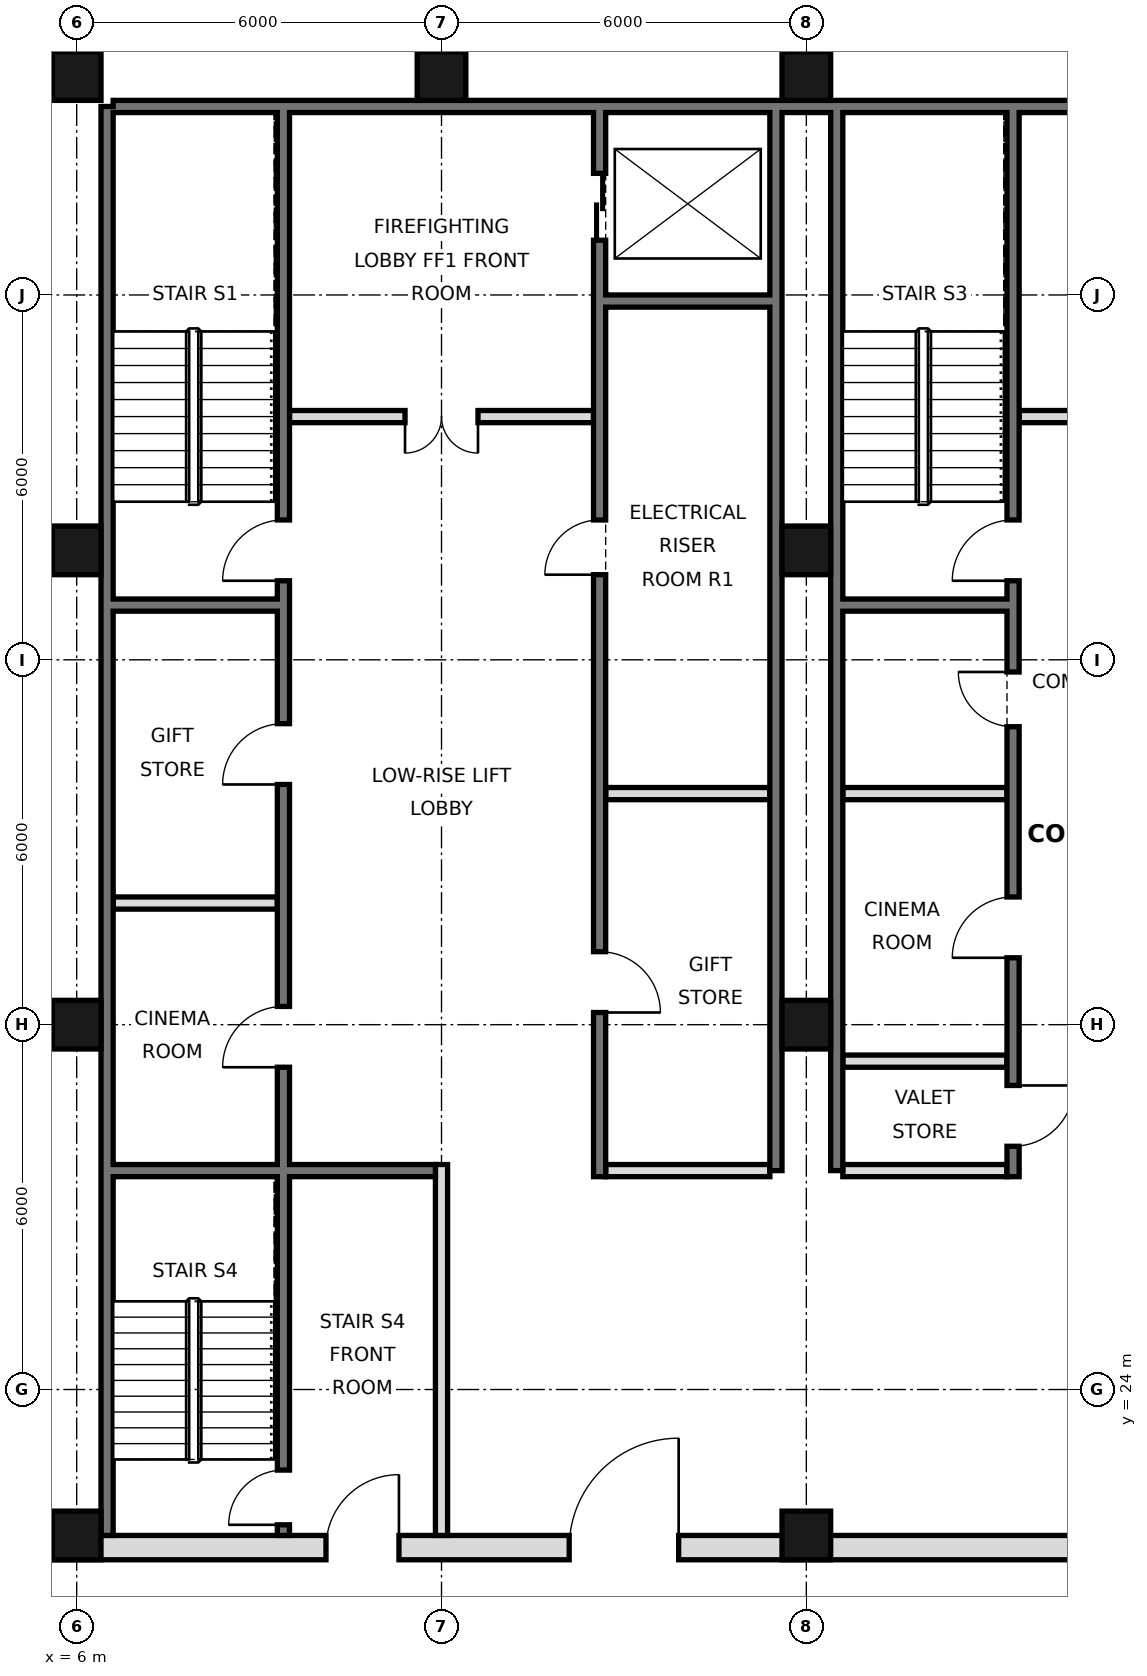
"""IFC4 building model, lengths in metres.
Left out: names, types, materials, properties, quantities, classifications, styles, units other than length and angle.
Written with IfcOpenShell. Run it as: python <this file> out.ifc"""

import sys

from ifc_helpers import new_model, si_unit, direction, frame, frame_2d, origin, origin_2d, place, context, subcontext, project, spatial, rectangle, hollow_rectangle, extrude, element, fill, save


model = new_model("IFC4")
c1 = context("Model", 3, precision=1e-05, world=origin(), true_north=direction((0.0, 1.0)))
c2 = subcontext(c1, "Body", "Model", "MODEL_VIEW")
j1 = project(units=[si_unit("LENGTHUNIT", "METRE"), si_unit("PLANEANGLEUNIT", "RADIAN")], contexts=[c1])
p1 = place(None, origin())
s1 = spatial("IfcSite", under=j1, at=p1, CompositionType="ELEMENT")
p2 = place(p1, origin())
s2 = spatial("IfcBuilding", under=s1, at=p2, CompositionType="ELEMENT")
p3 = place(p2, frame((0.0, 0.0, 254.0)))
s3 = spatial("IfcBuildingStorey", under=s2, at=p3, CompositionType="ELEMENT", Elevation=254.0)
for number, where, z_axis, x_axis in (
    (1, (6.0, 21.6, 0.0), (0.0, 0.0, 1.0), (1.0, 0.0, 0.0)),
    (2, (6.0, 30.0, 0.0), (0.0, 0.0, 1.0), (1.0, 0.0, 0.0)),
    (3, (6.0, 37.8, 0.0), (0.0, 0.0, 1.0), (1.0, 0.0, 0.0)),
    (4, (6.0, 45.6, 0.0), (0.0, 0.0, 1.0), (1.0, 0.0, 0.0)),
    (5, (12.0, 45.6, 0.0), (0.0, 0.0, 1.0), (1.0, 0.0, 0.0)),
    (6, (18.0, 21.6, 0.0), (0.0, 0.0, 1.0), (1.0, 0.0, 0.0)),
    (7, (18.0, 30.0, 0.0), (0.0, 0.0, 1.0), (1.0, 0.0, 0.0)),
    (8, (18.0, 37.8, 0.0), (0.0, 0.0, 1.0), (1.0, 0.0, 0.0)),
    (9, (18.0, 45.6, 0.0), (0.0, 0.0, 1.0), (1.0, 0.0, 0.0)),
):
    element("IfcColumn", number, at=place(p3, frame(where, z_axis=z_axis, x_axis=x_axis)), inside=s3, PredefinedType="COLUMN", context=c2, shape_type="SweptSolid", body=[
        extrude(hollow_rectangle(XDim=0.8, YDim=0.8, WallThickness=0.032, at=origin_2d()), origin(), (0.0, 0.0, 1.0), 3.6),
    ])
p4 = place(p3, frame((6.5, 21.6, 0.0), z_axis=(0.0, 0.0, 1.0), x_axis=(0.0, 1.0, 0.0)))
e10 = element("IfcWall", 10, at=p4, inside=s3, PredefinedType="SOLIDWALL", context=c2, shape_type="SweptSolid", body=[
    extrude(rectangle(XDim=23.5, YDim=0.2, at=frame_2d((11.75, 0.0))), origin(), (0.0, 0.0, 1.0), 3.38),
])
p5 = place(p3, frame((6.6, 45.1, 0.0), z_axis=(0.0, 0.0, 1.0), x_axis=(1.0, 0.0, 0.0)))
e11 = element("IfcWall", 11, at=p5, inside=s3, PredefinedType="SOLIDWALL", context=c2, shape_type="SweptSolid", body=[
    extrude(rectangle(XDim=34.8, YDim=0.2, at=frame_2d((17.4, 0.0))), origin(), (0.0, 0.0, 1.0), 3.38),
])
for number, where, z_axis, x_axis in (
    (12, (17.5, 27.6, 0.0), (0.0, 0.0, 1.0), (0.0, 1.0, 0.0)),
    (13, (18.5, 27.6, 0.0), (0.0, 0.0, 1.0), (0.0, 1.0, 0.0)),
):
    element("IfcWall", number, at=place(p3, frame(where, z_axis=z_axis, x_axis=x_axis)), inside=s3, PredefinedType="SOLIDWALL", context=c2, shape_type="SweptSolid", body=[
        extrude(rectangle(XDim=17.5, YDim=0.2, at=frame_2d((8.75, 0.0))), origin(), (0.0, 0.0, 1.0), 3.38),
    ])
p6 = place(p3, frame((5.6, 21.4, 0.0), z_axis=(0.0, 0.0, 1.0), x_axis=(1.0, 0.0, 0.0)))
e14 = element("IfcWall", 14, at=p6, inside=s3, PredefinedType="SOLIDWALL", context=c2, shape_type="SweptSolid", body=[
    extrude(rectangle(XDim=36.8, YDim=0.4, at=frame_2d((18.4, 0.0))), origin(), (0.0, 0.0, 1.0), 3.38),
])
p7 = place(p6, frame((8.5, 0.0, 0.0)))
e15 = element("IfcOpeningElement", 15, at=p7, cuts=e14, PredefinedType="OPENING", context=c2, shape_type="SweptSolid", body=[
    extrude(rectangle(XDim=1.8, YDim=2.1, at=frame_2d((0.9, 1.05))), frame((0.0, 0.21, 0.0), z_axis=(0.0, -1.0, 0.0), x_axis=(1.0, 0.0, 0.0)), (0.0, 0.0, 1.0), 0.42),
])
p8 = place(p6, frame((17.5, 0.0, 0.0)))
e16 = element("IfcOpeningElement", 16, at=p8, cuts=e14, PredefinedType="OPENING", context=c2, shape_type="SweptSolid", body=[
    extrude(rectangle(XDim=1.8, YDim=2.1, at=frame_2d((0.9, 1.05))), frame((0.0, 0.21, 0.0), z_axis=(0.0, -1.0, 0.0), x_axis=(1.0, 0.0, 0.0)), (0.0, 0.0, 1.0), 0.42),
])
p9 = place(p6, frame((26.5, 0.0, 0.0)))
e17 = element("IfcOpeningElement", 17, at=p9, cuts=e14, PredefinedType="OPENING", context=c2, shape_type="SweptSolid", body=[
    extrude(rectangle(XDim=1.8, YDim=2.1, at=frame_2d((0.9, 1.05))), frame((0.0, 0.21, 0.0), z_axis=(0.0, -1.0, 0.0), x_axis=(1.0, 0.0, 0.0)), (0.0, 0.0, 1.0), 0.42),
])
p10 = place(p6, frame((4.5, 0.0, 0.0)))
e18 = element("IfcOpeningElement", 18, at=p10, cuts=e14, PredefinedType="OPENING", context=c2, shape_type="SweptSolid", body=[
    extrude(rectangle(XDim=1.2, YDim=2.1, at=frame_2d((0.6, 1.05))), frame((0.0, 0.21, 0.0), z_axis=(0.0, -1.0, 0.0), x_axis=(1.0, 0.0, 0.0)), (0.0, 0.0, 1.0), 0.42),
])
p11 = place(p6, frame((31.1, 0.0, 0.0)))
e19 = element("IfcOpeningElement", 19, at=p11, cuts=e14, PredefinedType="OPENING", context=c2, shape_type="SweptSolid", body=[
    extrude(rectangle(XDim=1.2, YDim=2.1, at=frame_2d((0.6, 1.05))), frame((0.0, 0.21, 0.0), z_axis=(0.0, -1.0, 0.0), x_axis=(1.0, 0.0, 0.0)), (0.0, 0.0, 1.0), 0.42),
])
p12 = place(p3, frame((12.0, 21.6, 0.0), z_axis=(0.0, 0.0, 1.0), x_axis=(0.0, 1.0, 0.0)))
e20 = element("IfcWall", 20, at=p12, inside=s3, PredefinedType="PARTITIONING", context=c2, shape_type="SweptSolid", body=[
    extrude(rectangle(XDim=6.1, YDim=0.2, at=frame_2d((3.05, 0.0))), origin(), (0.0, 0.0, 1.0), 3.38),
])
p13 = place(p3, frame((14.6, 27.5, 0.0), z_axis=(0.0, 0.0, 1.0), x_axis=(0.0, 1.0, 0.0)))
e21 = element("IfcWall", 21, at=p13, inside=s3, PredefinedType="SOLIDWALL", context=c2, shape_type="SweptSolid", body=[
    extrude(rectangle(XDim=17.5, YDim=0.2, at=frame_2d((8.75, 0.0))), origin(), (0.0, 0.0, 1.0), 3.38),
])
p14 = place(p13, frame((15.4, 0.0, 0.0)))
e22 = element("IfcOpeningElement", 22, at=p14, cuts=e21, PredefinedType="OPENING", context=c2, shape_type="SweptSolid", body=[
    extrude(rectangle(XDim=1.1, YDim=2.1, at=frame_2d((0.55, 1.05))), frame((0.0, 0.11, 0.0), z_axis=(0.0, -1.0, 0.0), x_axis=(1.0, 0.0, 0.0)), (0.0, 0.0, 1.0), 0.22),
])
p15 = place(p13, frame((2.7, 0.0, 0.0)))
e23 = element("IfcOpeningElement", 23, at=p15, cuts=e21, PredefinedType="OPENING", context=c2, shape_type="SweptSolid", body=[
    extrude(rectangle(XDim=1.0, YDim=2.1, at=frame_2d((0.5, 1.05))), frame((0.0, 0.11, 0.0), z_axis=(0.0, -1.0, 0.0), x_axis=(1.0, 0.0, 0.0)), (0.0, 0.0, 1.0), 0.22),
])
p16 = place(p13, frame((9.9, 0.0, 0.0)))
e24 = element("IfcOpeningElement", 24, at=p16, cuts=e21, PredefinedType="OPENING", context=c2, shape_type="SweptSolid", body=[
    extrude(rectangle(XDim=0.9, YDim=2.1, at=frame_2d((0.45, 1.05))), frame((0.0, 0.11, 0.0), z_axis=(0.0, -1.0, 0.0), x_axis=(1.0, 0.0, 0.0)), (0.0, 0.0, 1.0), 0.22),
])
p17 = place(p3, frame((21.4, 27.5, 0.0), z_axis=(0.0, 0.0, 1.0), x_axis=(0.0, 1.0, 0.0)))
e25 = element("IfcWall", 25, at=p17, inside=s3, PredefinedType="SOLIDWALL", context=c2, shape_type="SweptSolid", body=[
    extrude(rectangle(XDim=17.5, YDim=0.2, at=frame_2d((8.75, 0.0))), origin(), (0.0, 0.0, 1.0), 3.38),
])
p18 = place(p17, frame((0.5, 0.0, 0.0)))
e26 = element("IfcOpeningElement", 26, at=p18, cuts=e25, PredefinedType="OPENING", context=c2, shape_type="SweptSolid", body=[
    extrude(rectangle(XDim=1.0, YDim=2.1, at=frame_2d((0.5, 1.05))), frame((0.0, 0.11, 0.0), z_axis=(0.0, -1.0, 0.0), x_axis=(1.0, 0.0, 0.0)), (0.0, 0.0, 1.0), 0.22),
])
p19 = place(p17, frame((3.6, 0.0, 0.0)))
e27 = element("IfcOpeningElement", 27, at=p19, cuts=e25, PredefinedType="OPENING", context=c2, shape_type="SweptSolid", body=[
    extrude(rectangle(XDim=1.0, YDim=2.1, at=frame_2d((0.5, 1.05))), frame((0.0, 0.11, 0.0), z_axis=(0.0, -1.0, 0.0), x_axis=(1.0, 0.0, 0.0)), (0.0, 0.0, 1.0), 0.22),
])
p20 = place(p17, frame((9.8, 0.0, 0.0)))
e28 = element("IfcOpeningElement", 28, at=p20, cuts=e25, PredefinedType="OPENING", context=c2, shape_type="SweptSolid", body=[
    extrude(rectangle(XDim=1.0, YDim=2.1, at=frame_2d((0.5, 1.05))), frame((0.0, 0.11, 0.0), z_axis=(0.0, -1.0, 0.0), x_axis=(1.0, 0.0, 0.0)), (0.0, 0.0, 1.0), 0.22),
])
p21 = place(p17, frame((7.4, 0.0, 0.0)))
e29 = element("IfcOpeningElement", 29, at=p21, cuts=e25, PredefinedType="OPENING", context=c2, shape_type="SweptSolid", body=[
    extrude(rectangle(XDim=0.9, YDim=2.1, at=frame_2d((0.45, 1.05))), frame((0.0, 0.11, 0.0), z_axis=(0.0, -1.0, 0.0), x_axis=(1.0, 0.0, 0.0)), (0.0, 0.0, 1.0), 0.22),
])
p22 = place(p3, frame((9.4, 21.6, 0.0), z_axis=(0.0, 0.0, 1.0), x_axis=(0.0, 1.0, 0.0)))
e30 = element("IfcWall", 30, at=p22, inside=s3, PredefinedType="SOLIDWALL", context=c2, shape_type="SweptSolid", body=[
    extrude(rectangle(XDim=23.4, YDim=0.2, at=frame_2d((11.7, 0.0))), origin(), (0.0, 0.0, 1.0), 3.38),
])
p23 = place(p22, frame((7.7, 0.0, 0.0)))
e31 = element("IfcOpeningElement", 31, at=p23, cuts=e30, PredefinedType="OPENING", context=c2, shape_type="SweptSolid", body=[
    extrude(rectangle(XDim=1.0, YDim=2.1, at=frame_2d((0.5, 1.05))), frame((0.0, 0.11, 0.0), z_axis=(0.0, -1.0, 0.0), x_axis=(1.0, 0.0, 0.0)), (0.0, 0.0, 1.0), 0.22),
])
p24 = place(p22, frame((12.35, 0.0, 0.0)))
e32 = element("IfcOpeningElement", 32, at=p24, cuts=e30, PredefinedType="OPENING", context=c2, shape_type="SweptSolid", body=[
    extrude(rectangle(XDim=1.0, YDim=2.1, at=frame_2d((0.5, 1.05))), frame((0.0, 0.11, 0.0), z_axis=(0.0, -1.0, 0.0), x_axis=(1.0, 0.0, 0.0)), (0.0, 0.0, 1.0), 0.22),
])
p25 = place(p22, frame((15.7, 0.0, 0.0)))
e33 = element("IfcOpeningElement", 33, at=p25, cuts=e30, PredefinedType="OPENING", context=c2, shape_type="SweptSolid", body=[
    extrude(rectangle(XDim=1.0, YDim=2.1, at=frame_2d((0.5, 1.05))), frame((0.0, 0.11, 0.0), z_axis=(0.0, -1.0, 0.0), x_axis=(1.0, 0.0, 0.0)), (0.0, 0.0, 1.0), 0.22),
])
p26 = place(p22, frame((0.175, 0.0, 0.0)))
e34 = element("IfcOpeningElement", 34, at=p26, cuts=e30, PredefinedType="OPENING", context=c2, shape_type="SweptSolid", body=[
    extrude(rectangle(XDim=0.9, YDim=2.1, at=frame_2d((0.45, 1.05))), frame((0.0, 0.11, 0.0), z_axis=(0.0, -1.0, 0.0), x_axis=(1.0, 0.0, 0.0)), (0.0, 0.0, 1.0), 0.22),
])
for number, where, z_axis, x_axis in (
    (35, (14.7, 27.6, 0.0), (0.0, 0.0, 1.0), (1.0, 0.0, 0.0)),
    (36, (18.6, 27.6, 0.0), (0.0, 0.0, 1.0), (1.0, 0.0, 0.0)),
):
    element("IfcWall", number, at=place(p3, frame(where, z_axis=z_axis, x_axis=x_axis)), inside=s3, PredefinedType="PARTITIONING", context=c2, shape_type="SweptSolid", body=[
        extrude(rectangle(XDim=2.7, YDim=0.2, at=frame_2d((1.35, 0.0))), origin(), (0.0, 0.0, 1.0), 3.38),
    ])
p27 = place(p3, frame((6.6, 27.6, 0.0), z_axis=(0.0, 0.0, 1.0), x_axis=(1.0, 0.0, 0.0)))
e37 = element("IfcWall", 37, at=p27, inside=s3, PredefinedType="SOLIDWALL", context=c2, shape_type="SweptSolid", body=[
    extrude(rectangle(XDim=5.3, YDim=0.2, at=frame_2d((2.65, 0.0))), origin(), (0.0, 0.0, 1.0), 3.38),
])
for number, where, z_axis, x_axis in (
    (38, (18.6, 29.4, 0.0), (0.0, 0.0, 1.0), (1.0, 0.0, 0.0)),
    (39, (6.6, 32.0, 0.0), (0.0, 0.0, 1.0), (1.0, 0.0, 0.0)),
):
    element("IfcWall", number, at=place(p3, frame(where, z_axis=z_axis, x_axis=x_axis)), inside=s3, PredefinedType="PARTITIONING", context=c2, shape_type="SweptSolid", body=[
        extrude(rectangle(XDim=2.7, YDim=0.2, at=frame_2d((1.35, 0.0))), origin(), (0.0, 0.0, 1.0), 3.38),
    ])
for number, where, z_axis, x_axis in (
    (40, (14.7, 33.8, 0.0), (0.0, 0.0, 1.0), (1.0, 0.0, 0.0)),
    (41, (18.6, 33.8, 0.0), (0.0, 0.0, 1.0), (1.0, 0.0, 0.0)),
    (42, (18.6, 36.9, 0.0), (0.0, 0.0, 1.0), (1.0, 0.0, 0.0)),
    (43, (6.6, 36.9, 0.0), (0.0, 0.0, 1.0), (1.0, 0.0, 0.0)),
):
    element("IfcWall", number, at=place(p3, frame(where, z_axis=z_axis, x_axis=x_axis)), inside=s3, PredefinedType="SOLIDWALL", context=c2, shape_type="SweptSolid", body=[
        extrude(rectangle(XDim=2.7, YDim=0.2, at=frame_2d((1.35, 0.0))), origin(), (0.0, 0.0, 1.0), 3.38),
    ])
p28 = place(p3, frame((21.5, 40.0, 0.0), z_axis=(0.0, 0.0, 1.0), x_axis=(1.0, 0.0, 0.0)))
e44 = element("IfcWall", 44, at=p28, inside=s3, PredefinedType="PARTITIONING", context=c2, shape_type="SweptSolid", body=[
    extrude(rectangle(XDim=7.9, YDim=0.2, at=frame_2d((3.95, 0.0))), origin(), (0.0, 0.0, 1.0), 3.38),
])
p29 = place(p28, frame((1.9, 0.0, 0.0)))
e45 = element("IfcOpeningElement", 45, at=p29, cuts=e44, PredefinedType="OPENING", context=c2, shape_type="SweptSolid", body=[
    extrude(rectangle(XDim=1.2, YDim=2.1, at=frame_2d((0.6, 1.05))), frame((0.0, 0.11, 0.0), z_axis=(0.0, -1.0, 0.0), x_axis=(1.0, 0.0, 0.0)), (0.0, 0.0, 1.0), 0.22),
])
p30 = place(p3, frame((9.5, 40.0, 0.0), z_axis=(0.0, 0.0, 1.0), x_axis=(1.0, 0.0, 0.0)))
e46 = element("IfcWall", 46, at=p30, inside=s3, PredefinedType="PARTITIONING", context=c2, shape_type="SweptSolid", body=[
    extrude(rectangle(XDim=5.0, YDim=0.2, at=frame_2d((2.5, 0.0))), origin(), (0.0, 0.0, 1.0), 3.38),
])
p31 = place(p30, frame((1.9, 0.0, 0.0)))
e47 = element("IfcOpeningElement", 47, at=p31, cuts=e46, PredefinedType="OPENING", context=c2, shape_type="SweptSolid", body=[
    extrude(rectangle(XDim=1.2, YDim=2.1, at=frame_2d((0.6, 1.05))), frame((0.0, 0.11, 0.0), z_axis=(0.0, -1.0, 0.0), x_axis=(1.0, 0.0, 0.0)), (0.0, 0.0, 1.0), 0.22),
])
p32 = place(p3, frame((14.7, 41.9, 0.0), z_axis=(0.0, 0.0, 1.0), x_axis=(1.0, 0.0, 0.0)))
e48 = element("IfcWall", 48, at=p32, inside=s3, PredefinedType="SOLIDWALL", context=c2, shape_type="SweptSolid", body=[
    extrude(rectangle(XDim=2.7, YDim=0.2, at=frame_2d((1.35, 0.0))), origin(), (0.0, 0.0, 1.0), 3.38),
])
p33 = place(p7, frame((1.8, 0.0, 0.0), z_axis=(0.0, 0.0, 1.0), x_axis=(-1.0, 0.0, 0.0)))
e49 = element("IfcDoor", 49, at=p33, inside=s3, OperationType="SINGLE_SWING_LEFT", PredefinedType="DOOR", context=c2, shape_type="SweptSolid", body=[
    extrude(rectangle(XDim=1.8, YDim=2.1, at=frame_2d((0.9, 1.05))), frame((0.0, 0.025, 0.0), z_axis=(0.0, -1.0, 0.0), x_axis=(1.0, 0.0, 0.0)), (0.0, 0.0, 1.0), 0.05),
])
fill(e15, e49)
p34 = place(p10, frame((1.2, 0.0, 0.0), z_axis=(0.0, 0.0, 1.0), x_axis=(-1.0, 0.0, 0.0)))
e50 = element("IfcDoor", 50, at=p34, inside=s3, OperationType="SINGLE_SWING_LEFT", PredefinedType="DOOR", context=c2, shape_type="SweptSolid", body=[
    extrude(rectangle(XDim=1.2, YDim=2.1, at=frame_2d((0.6, 1.05))), frame((0.0, 0.025, 0.0), z_axis=(0.0, -1.0, 0.0), x_axis=(1.0, 0.0, 0.0)), (0.0, 0.0, 1.0), 0.05),
])
fill(e18, e50)
p35 = place(p31, frame((1.2, 0.0, 0.0), z_axis=(0.0, 0.0, 1.0), x_axis=(-1.0, 0.0, 0.0)))
e51 = element("IfcDoor", 51, at=p35, inside=s3, OperationType="DOUBLE_DOOR_SINGLE_SWING", PredefinedType="DOOR", context=c2, shape_type="SweptSolid", body=[
    extrude(rectangle(XDim=1.2, YDim=2.1, at=frame_2d((0.6, 1.05))), frame((0.0, 0.025, 0.0), z_axis=(0.0, -1.0, 0.0), x_axis=(1.0, 0.0, 0.0)), (0.0, 0.0, 1.0), 0.05),
])
fill(e47, e51)
p36 = place(p14, origin())
e52 = element("IfcDoor", 52, at=p36, inside=s3, OperationType="DOUBLE_DOOR_SLIDING", PredefinedType="DOOR", context=c2, shape_type="SweptSolid", body=[
    extrude(rectangle(XDim=1.1, YDim=2.1, at=frame_2d((0.55, 1.05))), frame((0.0, 0.025, 0.0), z_axis=(0.0, -1.0, 0.0), x_axis=(1.0, 0.0, 0.0)), (0.0, 0.0, 1.0), 0.05),
])
fill(e22, e52)
p37 = place(p18, origin())
e53 = element("IfcDoor", 53, at=p37, inside=s3, OperationType="SINGLE_SWING_RIGHT", PredefinedType="DOOR", context=c2, shape_type="SweptSolid", body=[
    extrude(rectangle(XDim=1.0, YDim=2.1, at=frame_2d((0.5, 1.05))), frame((0.0, 0.025, 0.0), z_axis=(0.0, -1.0, 0.0), x_axis=(1.0, 0.0, 0.0)), (0.0, 0.0, 1.0), 0.05),
])
fill(e26, e53)
p38 = place(p19, origin())
e54 = element("IfcDoor", 54, at=p38, inside=s3, OperationType="SINGLE_SWING_LEFT", PredefinedType="DOOR", context=c2, shape_type="SweptSolid", body=[
    extrude(rectangle(XDim=1.0, YDim=2.1, at=frame_2d((0.5, 1.05))), frame((0.0, 0.025, 0.0), z_axis=(0.0, -1.0, 0.0), x_axis=(1.0, 0.0, 0.0)), (0.0, 0.0, 1.0), 0.05),
])
fill(e27, e54)
p39 = place(p15, frame((1.0, 0.0, 0.0), z_axis=(0.0, 0.0, 1.0), x_axis=(-1.0, 0.0, 0.0)))
e55 = element("IfcDoor", 55, at=p39, inside=s3, OperationType="SINGLE_SWING_RIGHT", PredefinedType="DOOR", context=c2, shape_type="SweptSolid", body=[
    extrude(rectangle(XDim=1.0, YDim=2.1, at=frame_2d((0.5, 1.05))), frame((0.0, 0.025, 0.0), z_axis=(0.0, -1.0, 0.0), x_axis=(1.0, 0.0, 0.0)), (0.0, 0.0, 1.0), 0.05),
])
fill(e23, e55)
p40 = place(p23, origin())
e56 = element("IfcDoor", 56, at=p40, inside=s3, OperationType="SINGLE_SWING_LEFT", PredefinedType="DOOR", context=c2, shape_type="SweptSolid", body=[
    extrude(rectangle(XDim=1.0, YDim=2.1, at=frame_2d((0.5, 1.05))), frame((0.0, 0.025, 0.0), z_axis=(0.0, -1.0, 0.0), x_axis=(1.0, 0.0, 0.0)), (0.0, 0.0, 1.0), 0.05),
])
fill(e31, e56)
p41 = place(p24, origin())
e57 = element("IfcDoor", 57, at=p41, inside=s3, OperationType="SINGLE_SWING_LEFT", PredefinedType="DOOR", context=c2, shape_type="SweptSolid", body=[
    extrude(rectangle(XDim=1.0, YDim=2.1, at=frame_2d((0.5, 1.05))), frame((0.0, 0.025, 0.0), z_axis=(0.0, -1.0, 0.0), x_axis=(1.0, 0.0, 0.0)), (0.0, 0.0, 1.0), 0.05),
])
fill(e32, e57)
p42 = place(p25, origin())
e58 = element("IfcDoor", 58, at=p42, inside=s3, OperationType="SINGLE_SWING_LEFT", PredefinedType="DOOR", context=c2, shape_type="SweptSolid", body=[
    extrude(rectangle(XDim=1.0, YDim=2.1, at=frame_2d((0.5, 1.05))), frame((0.0, 0.025, 0.0), z_axis=(0.0, -1.0, 0.0), x_axis=(1.0, 0.0, 0.0)), (0.0, 0.0, 1.0), 0.05),
])
fill(e33, e58)
p43 = place(p20, origin())
e59 = element("IfcDoor", 59, at=p43, inside=s3, OperationType="SINGLE_SWING_LEFT", PredefinedType="DOOR", context=c2, shape_type="SweptSolid", body=[
    extrude(rectangle(XDim=1.0, YDim=2.1, at=frame_2d((0.5, 1.05))), frame((0.0, 0.025, 0.0), z_axis=(0.0, -1.0, 0.0), x_axis=(1.0, 0.0, 0.0)), (0.0, 0.0, 1.0), 0.05),
])
fill(e28, e59)
p44 = place(p26, origin())
e60 = element("IfcDoor", 60, at=p44, inside=s3, OperationType="SINGLE_SWING_LEFT", PredefinedType="DOOR", context=c2, shape_type="SweptSolid", body=[
    extrude(rectangle(XDim=0.9, YDim=2.1, at=frame_2d((0.45, 1.05))), frame((0.0, 0.025, 0.0), z_axis=(0.0, -1.0, 0.0), x_axis=(1.0, 0.0, 0.0)), (0.0, 0.0, 1.0), 0.05),
])
fill(e34, e60)
p45 = place(p16, origin())
e61 = element("IfcDoor", 61, at=p45, inside=s3, OperationType="SINGLE_SWING_LEFT", PredefinedType="DOOR", context=c2, shape_type="SweptSolid", body=[
    extrude(rectangle(XDim=0.9, YDim=2.1, at=frame_2d((0.45, 1.05))), frame((0.0, 0.025, 0.0), z_axis=(0.0, -1.0, 0.0), x_axis=(1.0, 0.0, 0.0)), (0.0, 0.0, 1.0), 0.05),
])
fill(e24, e61)
p46 = place(p21, frame((0.9, 0.0, 0.0), z_axis=(0.0, 0.0, 1.0), x_axis=(-1.0, 0.0, 0.0)))
e62 = element("IfcDoor", 62, at=p46, inside=s3, OperationType="SINGLE_SWING_LEFT", PredefinedType="DOOR", context=c2, shape_type="SweptSolid", body=[
    extrude(rectangle(XDim=0.9, YDim=2.1, at=frame_2d((0.45, 1.05))), frame((0.0, 0.025, 0.0), z_axis=(0.0, -1.0, 0.0), x_axis=(1.0, 0.0, 0.0)), (0.0, 0.0, 1.0), 0.05),
])
fill(e29, e62)
save(model, sys.argv[1])
